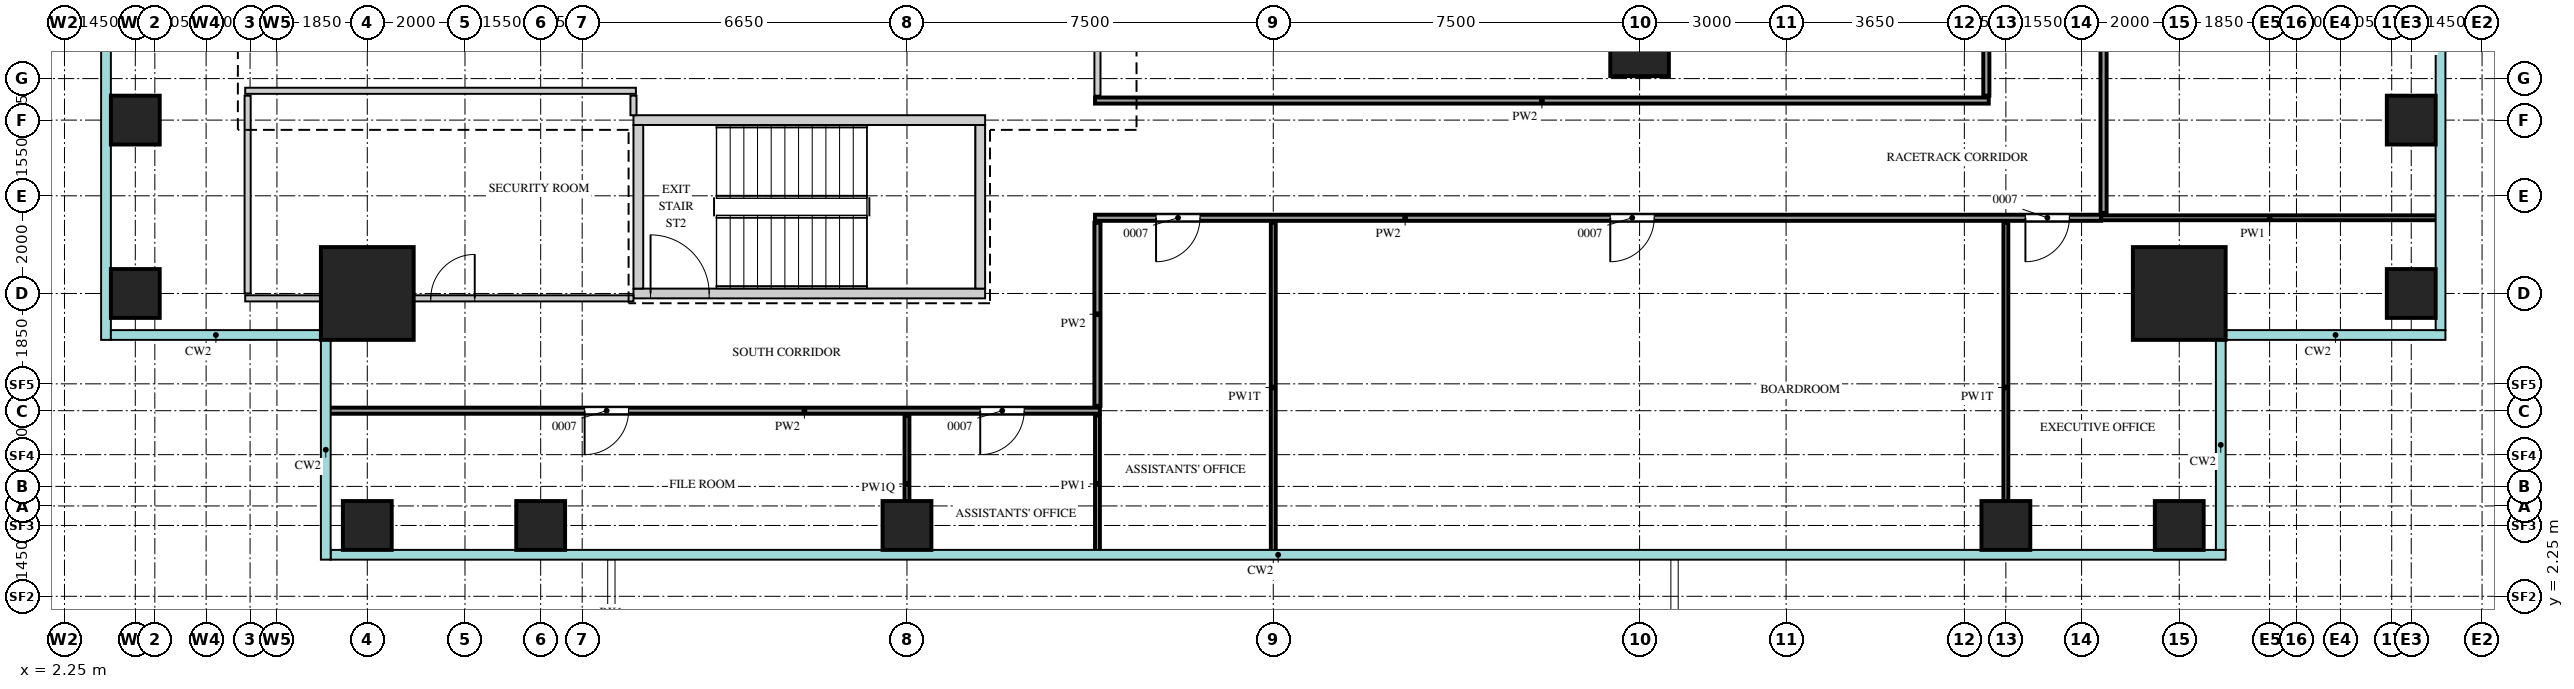
"""IFC4 building model, lengths in metres.
Left out: names, types, materials, properties, quantities, classifications, styles, units other than length and angle.
Written with IfcOpenShell. Run it as: python <this file> out.ifc"""

import sys

from ifc_helpers import new_model, si_unit, direction, frame, frame_2d, origin, origin_2d, place, context, subcontext, project, spatial, rectangle, extrude, source, transform, mapped, element, fill, save


model = new_model("IFC4")
c1 = context("Model", 3, precision=1e-05, world=origin(), true_north=direction((0.0, 1.0)))
c2 = subcontext(c1, "Body", "Model", "MODEL_VIEW")
j1 = project(units=[si_unit("LENGTHUNIT", "METRE"), si_unit("PLANEANGLEUNIT", "RADIAN")], contexts=[c1])
p1 = place(None, origin())
s1 = spatial("IfcSite", under=j1, at=p1, CompositionType="ELEMENT")
p2 = place(p1, origin())
s2 = spatial("IfcBuilding", under=s1, at=p2, CompositionType="ELEMENT")
p3 = place(p2, frame((0.0, 0.0, 204.7)))
s3 = spatial("IfcBuildingStorey", under=s2, at=p3, CompositionType="ELEMENT", Elevation=204.7)
m1 = source(origin(), c2, "Body", "SweptSolid", [
    extrude(rectangle(XDim=7.2, YDim=0.2, at=frame_2d((3.6, 0.0))), origin(), (0.0, 0.0, 1.0), 3.75),
])
p4 = place(p3, frame((13.9, 12.0, 0.0), z_axis=(0.0, 0.0, 1.0), x_axis=(1.0, 0.0, 0.0)))
e1 = element("IfcWall", 1, at=p4, inside=s3, PredefinedType="SHEAR", context=c2, shape_type="MappedRepresentation", body=[
    mapped(m1, transform((0.0, 0.0, 0.0))),
])
p5 = place(p3, frame((13.9, 8.45, 0.0), z_axis=(0.0, 0.0, 1.0), x_axis=(1.0, 0.0, 0.0)))
e2 = element("IfcWall", 2, at=p5, inside=s3, PredefinedType="SHEAR", context=c2, shape_type="MappedRepresentation", body=[
    mapped(m1, transform((0.0, 0.0, 0.0))),
])
m2 = source(origin(), c2, "Body", "SweptSolid", [
    extrude(rectangle(XDim=1.2, YDim=2.1, at=frame_2d((0.6, 1.05))), frame((0.0, 0.11, 0.0), z_axis=(0.0, -1.0, 0.0), x_axis=(1.0, 0.0, 0.0)), (0.0, 0.0, 1.0), 0.22),
])
p6 = place(p5, frame((0.35, 0.0, 0.0)))
e3 = element("IfcOpeningElement", 3, at=p6, cuts=e2, PredefinedType="OPENING", context=c2, shape_type="MappedRepresentation", body=[
    mapped(m2, transform((0.0, 0.0, 0.0))),
])
m3 = source(origin(), c2, "Body", "SweptSolid", [
    extrude(rectangle(XDim=3.35, YDim=0.2, at=frame_2d((1.675, 0.0))), origin(), (0.0, 0.0, 1.0), 3.75),
])
for number, where, z_axis, x_axis in (
    (4, (21.0, 8.55, 0.0), (0.0, 0.0, 1.0), (0.0, 1.0, 0.0)),
    (5, (14.0, 8.55, 0.0), (0.0, 0.0, 1.0), (0.0, 1.0, 0.0)),
):
    element("IfcWall", number, at=place(p3, frame(where, z_axis=z_axis, x_axis=x_axis)), inside=s3, PredefinedType="SHEAR", context=c2, shape_type="MappedRepresentation", body=[
        mapped(m3, transform((0.0, 0.0, 0.0))),
    ])
m4 = source(origin(), c2, "Body", "SweptSolid", [
    extrude(rectangle(XDim=1.9, YDim=1.9, at=origin_2d()), origin(), (0.0, 0.0, 1.0), 4.0),
])
for number, where, z_axis, x_axis in (
    (6, (45.55, 8.45, 0.0), (0.0, 0.0, 1.0), (1.0, 0.0, 0.0)),
    (7, (8.45, 8.45, 0.0), (0.0, 0.0, 1.0), (1.0, 0.0, 0.0)),
):
    element("IfcColumn", number, at=place(p3, frame(where, z_axis=z_axis, x_axis=x_axis)), inside=s3, PredefinedType="COLUMN", context=c2, shape_type="MappedRepresentation", body=[
        mapped(m4, transform((0.0, 0.0, 0.0))),
    ])
m5 = source(origin(), c2, "Body", "SweptSolid", [
    extrude(rectangle(XDim=1.0, YDim=1.0, at=origin_2d()), origin(), (0.0, 0.0, 1.0), 3.75),
])
for number, where, z_axis, x_axis in (
    (8, (8.45, 3.7, 0.0), (0.0, 0.0, 1.0), (1.0, 0.0, 0.0)),
    (9, (12.0, 3.7, 0.0), (0.0, 0.0, 1.0), (1.0, 0.0, 0.0)),
    (10, (19.5, 3.7, 0.0), (0.0, 0.0, 1.0), (1.0, 0.0, 0.0)),
    (11, (42.0, 3.7, 0.0), (0.0, 0.0, 1.0), (1.0, 0.0, 0.0)),
    (12, (45.55, 3.7, 0.0), (0.0, 0.0, 1.0), (1.0, 0.0, 0.0)),
    (13, (50.3, 8.45, 0.0), (0.0, 0.0, 1.0), (1.0, 0.0, 0.0)),
    (14, (50.3, 12.0, 0.0), (0.0, 0.0, 1.0), (1.0, 0.0, 0.0)),
    (15, (3.7, 8.45, 0.0), (0.0, 0.0, 1.0), (1.0, 0.0, 0.0)),
    (16, (3.7, 12.0, 0.0), (0.0, 0.0, 1.0), (1.0, 0.0, 0.0)),
):
    element("IfcColumn", number, at=place(p3, frame(where, z_axis=z_axis, x_axis=x_axis)), inside=s3, PredefinedType="COLUMN", context=c2, shape_type="MappedRepresentation", body=[
        mapped(m5, transform((0.0, 0.0, 0.0))),
    ])
m6 = source(origin(), c2, "Body", "SweptSolid", [
    extrude(rectangle(XDim=1.2, YDim=1.2, at=origin_2d()), origin(), (0.0, 0.0, 1.0), 3.75),
])
p7 = place(p3, frame((34.5, 13.5, 0.0), z_axis=(0.0, 0.0, 1.0), x_axis=(1.0, 0.0, 0.0)))
e17 = element("IfcColumn", 17, at=p7, inside=s3, PredefinedType="COLUMN", context=c2, shape_type="MappedRepresentation", body=[
    mapped(m6, transform((0.0, 0.0, 0.0))),
])
m7 = source(origin(), c2, "Body", "SweptSolid", [
    extrude(rectangle(XDim=2.8, YDim=0.1, at=frame_2d((1.4, 0.0))), origin(), (0.0, 0.0, 1.0), 3.42),
])
p8 = place(p3, frame((19.5, 3.15, 0.0), z_axis=(0.0, 0.0, 1.0), x_axis=(0.0, 1.0, 0.0)))
e18 = element("IfcWall", 18, at=p8, inside=s3, PredefinedType="PARTITIONING", context=c2, shape_type="MappedRepresentation", body=[
    mapped(m7, transform((0.0, 0.0, 0.0))),
])
m8 = source(origin(), c2, "Body", "SweptSolid", [
    extrude(rectangle(XDim=2.8, YDim=0.1, at=frame_2d((1.4, 0.0))), origin(), (0.0, 0.0, 1.0), 3.8),
])
p9 = place(p3, frame((23.4, 3.15, 0.0), z_axis=(0.0, 0.0, 1.0), x_axis=(0.0, 1.0, 0.0)))
e19 = element("IfcWall", 19, at=p9, inside=s3, PredefinedType="PARTITIONING", context=c2, shape_type="MappedRepresentation", body=[
    mapped(m8, transform((0.0, 0.0, 0.0))),
])
m9 = source(origin(), c2, "Body", "SweptSolid", [
    extrude(rectangle(XDim=6.75, YDim=0.1, at=frame_2d((3.375, 0.0))), origin(), (0.0, 0.0, 1.0), 3.3),
])
for number, where, z_axis, x_axis in (
    (20, (27.0, 3.15, 0.0), (0.0, 0.0, 1.0), (0.0, 1.0, 0.0)),
    (21, (42.0, 3.15, 0.0), (0.0, 0.0, 1.0), (0.0, 1.0, 0.0)),
):
    element("IfcWall", number, at=place(p3, frame(where, z_axis=z_axis, x_axis=x_axis)), inside=s3, PredefinedType="PARTITIONING", context=c2, shape_type="MappedRepresentation", body=[
        mapped(m9, transform((0.0, 0.0, 0.0))),
    ])
m10 = source(origin(), c2, "Body", "SweptSolid", [
    extrude(rectangle(XDim=15.8, YDim=0.125, at=frame_2d((7.9, 0.0))), origin(), (0.0, 0.0, 1.0), 3.8),
])
p10 = place(p3, frame((7.65, 6.05, 0.0), z_axis=(0.0, 0.0, 1.0), x_axis=(1.0, 0.0, 0.0)))
e22 = element("IfcWall", 22, at=p10, inside=s3, PredefinedType="PARTITIONING", context=c2, shape_type="MappedRepresentation", body=[
    mapped(m10, transform((0.0, 0.0, 0.0))),
])
m11 = source(origin(), c2, "Body", "SweptSolid", [
    extrude(rectangle(XDim=0.9, YDim=2.1, at=frame_2d((0.45, 1.05))), frame((0.0, 0.073, 0.0), z_axis=(0.0, -1.0, 0.0), x_axis=(1.0, 0.0, 0.0)), (0.0, 0.0, 1.0), 0.145),
])
p11 = place(p10, frame((5.25, 0.0, 0.0)))
e23 = element("IfcOpeningElement", 23, at=p11, cuts=e22, PredefinedType="OPENING", context=c2, shape_type="MappedRepresentation", body=[
    mapped(m11, transform((0.0, 0.0, 0.0))),
])
p12 = place(p10, frame((13.35, 0.0, 0.0)))
e24 = element("IfcOpeningElement", 24, at=p12, cuts=e22, PredefinedType="OPENING", context=c2, shape_type="MappedRepresentation", body=[
    mapped(m11, transform((0.0, 0.0, 0.0))),
])
m12 = source(origin(), c2, "Body", "SweptSolid", [
    extrude(rectangle(XDim=3.75, YDim=0.125, at=frame_2d((1.875, 0.0))), origin(), (0.0, 0.0, 1.0), 3.8),
])
p13 = place(p3, frame((23.4, 6.15, 0.0), z_axis=(0.0, 0.0, 1.0), x_axis=(0.0, 1.0, 0.0)))
e25 = element("IfcWall", 25, at=p13, inside=s3, PredefinedType="PARTITIONING", context=c2, shape_type="MappedRepresentation", body=[
    mapped(m12, transform((0.0, 0.0, 0.0))),
])
m13 = source(origin(), c2, "Body", "SweptSolid", [
    extrude(rectangle(XDim=7.95, YDim=0.125, at=frame_2d((3.975, 0.0))), origin(), (0.0, 0.0, 1.0), 3.25),
])
p14 = place(p3, frame((5.95, 8.35, 0.0), z_axis=(0.0, 0.0, 1.0), x_axis=(1.0, 0.0, 0.0)))
e26 = element("IfcWall", 26, at=p14, inside=s3, PredefinedType="PARTITIONING", context=c2, shape_type="MappedRepresentation", body=[
    mapped(m13, transform((0.0, 0.0, 0.0))),
])
p15 = place(p14, frame((3.8, 0.0, 0.0)))
e27 = element("IfcOpeningElement", 27, at=p15, cuts=e26, PredefinedType="OPENING", context=c2, shape_type="MappedRepresentation", body=[
    mapped(m11, transform((0.0, 0.0, 0.0))),
])
m14 = source(origin(), c2, "Body", "SweptSolid", [
    extrude(rectangle(XDim=4.05, YDim=0.125, at=frame_2d((2.025, 0.0))), origin(), (0.0, 0.0, 1.0), 3.8),
])
p16 = place(p3, frame((6.0, 8.45, 0.0), z_axis=(0.0, 0.0, 1.0), x_axis=(0.0, 1.0, 0.0)))
e28 = element("IfcWall", 28, at=p16, inside=s3, PredefinedType="PARTITIONING", context=c2, shape_type="MappedRepresentation", body=[
    mapped(m14, transform((0.0, 0.0, 0.0))),
])
m15 = source(origin(), c2, "Body", "SweptSolid", [
    extrude(rectangle(XDim=20.6, YDim=0.125, at=frame_2d((10.3, 0.0))), origin(), (0.0, 0.0, 1.0), 3.8),
])
p17 = place(p3, frame((23.35, 10.0, 0.0), z_axis=(0.0, 0.0, 1.0), x_axis=(1.0, 0.0, 0.0)))
e29 = element("IfcWall", 29, at=p17, inside=s3, PredefinedType="PARTITIONING", context=c2, shape_type="MappedRepresentation", body=[
    mapped(m15, transform((0.0, 0.0, 0.0))),
])
p18 = place(p17, frame((1.25, 0.0, 0.0)))
e30 = element("IfcOpeningElement", 30, at=p18, cuts=e29, PredefinedType="OPENING", context=c2, shape_type="MappedRepresentation", body=[
    mapped(m11, transform((0.0, 0.0, 0.0))),
])
p19 = place(p17, frame((10.55, 0.0, 0.0)))
e31 = element("IfcOpeningElement", 31, at=p19, cuts=e29, PredefinedType="OPENING", context=c2, shape_type="MappedRepresentation", body=[
    mapped(m11, transform((0.0, 0.0, 0.0))),
])
p20 = place(p17, frame((19.05, 0.0, 0.0)))
e32 = element("IfcOpeningElement", 32, at=p20, cuts=e29, PredefinedType="OPENING", context=c2, shape_type="MappedRepresentation", body=[
    mapped(m11, transform((0.0, 0.0, 0.0))),
])
m16 = source(origin(), c2, "Body", "SweptSolid", [
    extrude(rectangle(XDim=6.9, YDim=0.1, at=frame_2d((3.45, 0.0))), origin(), (0.0, 0.0, 1.0), 3.8),
])
p21 = place(p3, frame((43.95, 10.0, 0.0), z_axis=(0.0, 0.0, 1.0), x_axis=(1.0, 0.0, 0.0)))
e33 = element("IfcWall", 33, at=p21, inside=s3, PredefinedType="PARTITIONING", context=c2, shape_type="MappedRepresentation", body=[
    mapped(m16, transform((0.0, 0.0, 0.0))),
])
m17 = source(origin(), c2, "Body", "SweptSolid", [
    extrude(rectangle(XDim=33.8, YDim=0.125, at=frame_2d((16.9, 0.0))), origin(), (0.0, 0.0, 1.0), 3.8),
])
p22 = place(p3, frame((44.0, 10.1, 0.0), z_axis=(0.0, 0.0, 1.0), x_axis=(0.0, 1.0, 0.0)))
e34 = element("IfcWall", 34, at=p22, inside=s3, PredefinedType="PARTITIONING", context=c2, shape_type="MappedRepresentation", body=[
    mapped(m17, transform((0.0, 0.0, 0.0))),
])
p23 = place(p22, frame((9.0, 0.0, 0.0)))
e35 = element("IfcOpeningElement", 35, at=p23, cuts=e34, PredefinedType="OPENING", context=c2, shape_type="MappedRepresentation", body=[
    mapped(m11, transform((0.0, 0.0, 0.0))),
])
p24 = place(p22, frame((23.6, 0.0, 0.0)))
e36 = element("IfcOpeningElement", 36, at=p24, cuts=e34, PredefinedType="OPENING", context=c2, shape_type="MappedRepresentation", body=[
    mapped(m11, transform((0.0, 0.0, 0.0))),
])
m18 = source(origin(), c2, "Body", "SweptSolid", [
    extrude(rectangle(XDim=0.4, YDim=0.125, at=frame_2d((0.2, 0.0))), origin(), (0.0, 0.0, 1.0), 3.8),
])
p25 = place(p3, frame((13.9, 12.1, 0.0), z_axis=(0.0, 0.0, 1.0), x_axis=(0.0, 1.0, 0.0)))
e37 = element("IfcWall", 37, at=p25, inside=s3, PredefinedType="PARTITIONING", context=c2, shape_type="MappedRepresentation", body=[
    mapped(m18, transform((0.0, 0.0, 0.0))),
])
m19 = source(origin(), c2, "Body", "SweptSolid", [
    extrude(rectangle(XDim=18.3, YDim=0.125, at=frame_2d((9.15, 0.0))), origin(), (0.0, 0.0, 1.0), 3.8),
])
p26 = place(p3, frame((23.35, 12.4, 0.0), z_axis=(0.0, 0.0, 1.0), x_axis=(1.0, 0.0, 0.0)))
e38 = element("IfcWall", 38, at=p26, inside=s3, PredefinedType="PARTITIONING", context=c2, shape_type="MappedRepresentation", body=[
    mapped(m19, transform((0.0, 0.0, 0.0))),
])
m20 = source(origin(), c2, "Body", "SweptSolid", [
    extrude(rectangle(XDim=23.4, YDim=0.125, at=frame_2d((11.7, 0.0))), origin(), (0.0, 0.0, 1.0), 3.8),
])
p27 = place(p3, frame((23.4, 12.5, 0.0), z_axis=(0.0, 0.0, 1.0), x_axis=(0.0, 1.0, 0.0)))
e39 = element("IfcWall", 39, at=p27, inside=s3, PredefinedType="PARTITIONING", context=c2, shape_type="MappedRepresentation", body=[
    mapped(m20, transform((0.0, 0.0, 0.0))),
])
m21 = source(origin(), c2, "Body", "SweptSolid", [
    extrude(rectangle(XDim=1.2, YDim=2.1, at=frame_2d((0.6, 1.05))), frame((0.0, 0.073, 0.0), z_axis=(0.0, -1.0, 0.0), x_axis=(1.0, 0.0, 0.0)), (0.0, 0.0, 1.0), 0.145),
])
p28 = place(p27, frame((11.1, 0.0, 0.0)))
e40 = element("IfcOpeningElement", 40, at=p28, cuts=e39, PredefinedType="OPENING", context=c2, shape_type="MappedRepresentation", body=[
    mapped(m21, transform((0.0, 0.0, 0.0))),
])
m22 = source(origin(), c2, "Body", "SweptSolid", [
    extrude(rectangle(XDim=29.0, YDim=0.125, at=frame_2d((14.5, 0.0))), origin(), (0.0, 0.0, 1.0), 3.8),
])
p29 = place(p3, frame((41.6, 12.5, 0.0), z_axis=(0.0, 0.0, 1.0), x_axis=(0.0, 1.0, 0.0)))
e41 = element("IfcWall", 41, at=p29, inside=s3, PredefinedType="PARTITIONING", context=c2, shape_type="MappedRepresentation", body=[
    mapped(m22, transform((0.0, 0.0, 0.0))),
])
p30 = place(p29, frame((25.7, 0.0, 0.0)))
e42 = element("IfcOpeningElement", 42, at=p30, cuts=e41, PredefinedType="OPENING", context=c2, shape_type="MappedRepresentation", body=[
    mapped(m11, transform((0.0, 0.0, 0.0))),
])
m23 = source(origin(), c2, "Body", "SweptSolid", [
    extrude(rectangle(XDim=8.0, YDim=0.125, at=frame_2d((4.0, 0.0))), origin(), (0.0, 0.0, 1.0), 3.8),
])
p31 = place(p3, frame((5.95, 12.6, 0.0), z_axis=(0.0, 0.0, 1.0), x_axis=(1.0, 0.0, 0.0)))
e43 = element("IfcWall", 43, at=p31, inside=s3, PredefinedType="PARTITIONING", context=c2, shape_type="MappedRepresentation", body=[
    mapped(m23, transform((0.0, 0.0, 0.0))),
])
m24 = source(origin(), c2, "Body", "SweptSolid", [
    extrude(rectangle(XDim=0.9, YDim=2.1, at=frame_2d((0.45, 1.05))), frame((0.0, 0.025, 0.0), z_axis=(0.0, -1.0, 0.0), x_axis=(1.0, 0.0, 0.0)), (0.0, 0.0, 1.0), 0.05),
])
p32 = place(p18, origin())
e44 = element("IfcDoor", 44, at=p32, inside=s3, OperationType="SINGLE_SWING_LEFT", PredefinedType="DOOR", context=c2, shape_type="MappedRepresentation", body=[
    mapped(m24, transform((0.0, 0.0, 0.0))),
])
fill(e30, e44)
p33 = place(p19, origin())
e45 = element("IfcDoor", 45, at=p33, inside=s3, OperationType="SINGLE_SWING_LEFT", PredefinedType="DOOR", context=c2, shape_type="MappedRepresentation", body=[
    mapped(m24, transform((0.0, 0.0, 0.0))),
])
fill(e31, e45)
p34 = place(p20, origin())
e46 = element("IfcDoor", 46, at=p34, inside=s3, OperationType="SINGLE_SWING_LEFT", PredefinedType="DOOR", context=c2, shape_type="MappedRepresentation", body=[
    mapped(m24, transform((0.0, 0.0, 0.0))),
])
fill(e32, e46)
p35 = place(p15, origin())
e47 = element("IfcDoor", 47, at=p35, inside=s3, OperationType="SINGLE_SWING_LEFT", PredefinedType="DOOR", context=c2, shape_type="MappedRepresentation", body=[
    mapped(m24, transform((0.0, 0.0, 0.0))),
])
fill(e27, e47)
p36 = place(p11, origin())
e48 = element("IfcDoor", 48, at=p36, inside=s3, OperationType="SINGLE_SWING_LEFT", PredefinedType="DOOR", context=c2, shape_type="MappedRepresentation", body=[
    mapped(m24, transform((0.0, 0.0, 0.0))),
])
fill(e23, e48)
p37 = place(p12, origin())
e49 = element("IfcDoor", 49, at=p37, inside=s3, OperationType="SINGLE_SWING_LEFT", PredefinedType="DOOR", context=c2, shape_type="MappedRepresentation", body=[
    mapped(m24, transform((0.0, 0.0, 0.0))),
])
fill(e24, e49)
m25 = source(origin(), c2, "Body", "SweptSolid", [
    extrude(rectangle(XDim=1.2, YDim=2.1, at=frame_2d((0.6, 1.05))), frame((0.0, 0.025, 0.0), z_axis=(0.0, -1.0, 0.0), x_axis=(1.0, 0.0, 0.0)), (0.0, 0.0, 1.0), 0.05),
])
p38 = place(p6, origin())
e50 = element("IfcDoor", 50, at=p38, inside=s3, OperationType="SINGLE_SWING_RIGHT", PredefinedType="DOOR", context=c2, shape_type="MappedRepresentation", body=[
    mapped(m25, transform((0.0, 0.0, 0.0))),
])
fill(e3, e50)
save(model, sys.argv[1])
